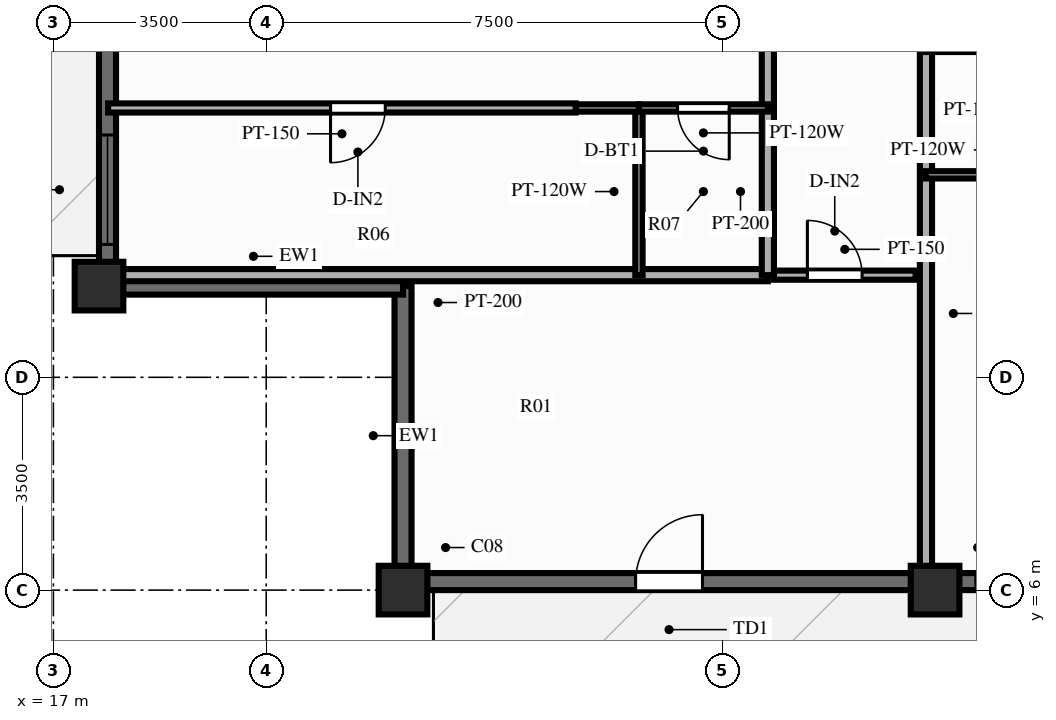
"""IFC4 building model, lengths in metres.
Left out: names, types, materials, properties, quantities, classifications, styles, units other than length and angle.
Written with IfcOpenShell. Run it as: python <this file> out.ifc"""

import sys

from ifc_helpers import new_model, si_unit, direction, frame, frame_2d, origin, origin_2d, place, context, subcontext, project, spatial, rectangle, extrude, source, transform, mapped, element, fill, save


model = new_model("IFC4")
c1 = context("Model", 3, precision=1e-05, world=origin(), true_north=direction((0.0, 1.0)))
c2 = subcontext(c1, "Body", "Model", "MODEL_VIEW")
j1 = project(units=[si_unit("LENGTHUNIT", "METRE"), si_unit("PLANEANGLEUNIT", "RADIAN")], contexts=[c1])
p1 = place(None, origin())
s1 = spatial("IfcSite", under=j1, at=p1, CompositionType="ELEMENT")
p2 = place(p1, origin())
s2 = spatial("IfcBuilding", under=s1, at=p2, CompositionType="ELEMENT")
p3 = place(p2, frame((0.0, 0.0, 182.8)))
s3 = spatial("IfcBuildingStorey", under=s2, at=p3, CompositionType="ELEMENT", Elevation=182.8)
m1 = source(origin(), c2, "Body", "SweptSolid", [
    extrude(rectangle(XDim=0.8, YDim=0.8, at=origin_2d()), origin(), (0.0, 0.0, 1.0), 3.9),
])
for number, where, z_axis, x_axis in (
    (1, (22.75, 6.0, 0.0), (0.0, 0.0, 1.0), (1.0, 0.0, 0.0)),
    (2, (31.5, 6.0, 0.0), (0.0, 0.0, 1.0), (1.0, 0.0, 0.0)),
    (3, (17.75, 11.0, 0.0), (0.0, 0.0, 1.0), (1.0, 0.0, 0.0)),
):
    element("IfcColumn", number, at=place(p3, frame(where, z_axis=z_axis, x_axis=x_axis)), inside=s3, PredefinedType="COLUMN", context=c2, shape_type="MappedRepresentation", body=[
        mapped(m1, transform((0.0, 0.0, 0.0), scale=1.0)),
    ])
p4 = place(p3, frame((22.75, 6.14, 0.0), z_axis=(0.0, 0.0, 1.0), x_axis=(1.0, 0.0, 0.0)))
e4 = element("IfcWall", 4, at=p4, inside=s3, PredefinedType="SOLIDWALL", context=c2, shape_type="SweptSolid", body=[
    extrude(rectangle(XDim=30.5, YDim=0.28, at=frame_2d((15.25, 0.0))), origin(), (0.0, 0.0, 1.0), 2.79),
])
p5 = place(p4, frame((4.925, 0.0, 0.0), z_axis=(0.0, 0.0, 1.0), x_axis=(-1.0, 0.0, 0.0)))
e5 = element("IfcOpeningElement", 5, at=p5, cuts=e4, PredefinedType="OPENING", context=c2, shape_type="SweptSolid", body=[
    extrude(rectangle(XDim=1.1, YDim=2.15, at=frame_2d((0.55, 1.075))), frame((0.0, 0.152, 0.0), z_axis=(0.0, -1.0, 0.0), x_axis=(1.0, 0.0, 0.0)), (0.0, 0.0, 1.0), 0.304),
])
p6 = place(p4, frame((9.42, 0.0, 0.85)))
e6 = element("IfcOpeningElement", 6, at=p6, cuts=e4, PredefinedType="OPENING", context=c2, shape_type="SweptSolid", body=[
    extrude(rectangle(XDim=0.95, YDim=1.5, at=frame_2d((0.475, 0.75))), frame((0.0, 0.152, 0.0), z_axis=(0.0, -1.0, 0.0), x_axis=(1.0, 0.0, 0.0)), (0.0, 0.0, 1.0), 0.304),
])
p7 = place(p4, frame((11.244, 0.0, 0.85)))
e7 = element("IfcOpeningElement", 7, at=p7, cuts=e4, PredefinedType="OPENING", context=c2, shape_type="SweptSolid", body=[
    extrude(rectangle(XDim=1.2, YDim=1.5, at=frame_2d((0.6, 0.75))), frame((0.0, 0.152, 0.0), z_axis=(0.0, -1.0, 0.0), x_axis=(1.0, 0.0, 0.0)), (0.0, 0.0, 1.0), 0.304),
])
p8 = place(p4, frame((13.452, 0.0, 0.85)))
e8 = element("IfcOpeningElement", 8, at=p8, cuts=e4, PredefinedType="OPENING", context=c2, shape_type="SweptSolid", body=[
    extrude(rectangle(XDim=1.5, YDim=1.65, at=frame_2d((0.75, 0.825))), frame((0.0, 0.152, 0.0), z_axis=(0.0, -1.0, 0.0), x_axis=(1.0, 0.0, 0.0)), (0.0, 0.0, 1.0), 0.304),
])
p9 = place(p4, frame((16.383, 0.0, 0.85)))
e9 = element("IfcOpeningElement", 9, at=p9, cuts=e4, PredefinedType="OPENING", context=c2, shape_type="SweptSolid", body=[
    extrude(rectangle(XDim=1.8, YDim=1.65, at=frame_2d((0.9, 0.825))), frame((0.0, 0.152, 0.0), z_axis=(0.0, -1.0, 0.0), x_axis=(1.0, 0.0, 0.0)), (0.0, 0.0, 1.0), 0.304),
])
p10 = place(p4, frame((19.53, 0.0, 0.85)))
e10 = element("IfcOpeningElement", 10, at=p10, cuts=e4, PredefinedType="OPENING", context=c2, shape_type="SweptSolid", body=[
    extrude(rectangle(XDim=1.5, YDim=1.65, at=frame_2d((0.75, 0.825))), frame((0.0, 0.152, 0.0), z_axis=(0.0, -1.0, 0.0), x_axis=(1.0, 0.0, 0.0)), (0.0, 0.0, 1.0), 0.304),
])
p11 = place(p4, frame((25.225, 0.0, 0.85)))
e11 = element("IfcOpeningElement", 11, at=p11, cuts=e4, PredefinedType="OPENING", context=c2, shape_type="SweptSolid", body=[
    extrude(rectangle(XDim=1.8, YDim=1.65, at=frame_2d((0.9, 0.825))), frame((0.0, 0.152, 0.0), z_axis=(0.0, -1.0, 0.0), x_axis=(1.0, 0.0, 0.0)), (0.0, 0.0, 1.0), 0.304),
])
p12 = place(p3, frame((17.89, 11.0, 0.0), z_axis=(0.0, 0.0, 1.0), x_axis=(0.0, 1.0, 0.0)))
e12 = element("IfcWall", 12, at=p12, inside=s3, PredefinedType="SOLIDWALL", context=c2, shape_type="SweptSolid", body=[
    extrude(rectangle(XDim=32.0, YDim=0.28, at=frame_2d((16.0, 0.0))), origin(), (0.0, 0.0, 1.0), 2.79),
])
p13 = place(p12, frame((0.685, 0.0, 0.85)))
e13 = element("IfcOpeningElement", 13, at=p13, cuts=e12, PredefinedType="OPENING", context=c2, shape_type="SweptSolid", body=[
    extrude(rectangle(XDim=1.8, YDim=1.65, at=frame_2d((0.9, 0.825))), frame((0.0, 0.152, 0.0), z_axis=(0.0, -1.0, 0.0), x_axis=(1.0, 0.0, 0.0)), (0.0, 0.0, 1.0), 0.304),
])
p14 = place(p12, frame((3.945, 0.0, 0.85)))
e14 = element("IfcOpeningElement", 14, at=p14, cuts=e12, PredefinedType="OPENING", context=c2, shape_type="SweptSolid", body=[
    extrude(rectangle(XDim=1.8, YDim=1.65, at=frame_2d((0.9, 0.825))), frame((0.0, 0.152, 0.0), z_axis=(0.0, -1.0, 0.0), x_axis=(1.0, 0.0, 0.0)), (0.0, 0.0, 1.0), 0.304),
])
p15 = place(p12, frame((8.367, 0.0, 0.85)))
e15 = element("IfcOpeningElement", 15, at=p15, cuts=e12, PredefinedType="OPENING", context=c2, shape_type="SweptSolid", body=[
    extrude(rectangle(XDim=1.8, YDim=1.65, at=frame_2d((0.9, 0.825))), frame((0.0, 0.152, 0.0), z_axis=(0.0, -1.0, 0.0), x_axis=(1.0, 0.0, 0.0)), (0.0, 0.0, 1.0), 0.304),
])
p16 = place(p12, frame((11.729, 0.0, 0.85)))
e16 = element("IfcOpeningElement", 16, at=p16, cuts=e12, PredefinedType="OPENING", context=c2, shape_type="SweptSolid", body=[
    extrude(rectangle(XDim=1.8, YDim=1.65, at=frame_2d((0.9, 0.825))), frame((0.0, 0.152, 0.0), z_axis=(0.0, -1.0, 0.0), x_axis=(1.0, 0.0, 0.0)), (0.0, 0.0, 1.0), 0.304),
])
p17 = place(p12, frame((15.066, 0.0, 0.0)))
e17 = element("IfcOpeningElement", 17, at=p17, cuts=e12, PredefinedType="OPENING", context=c2, shape_type="SweptSolid", body=[
    extrude(rectangle(XDim=1.6, YDim=2.15, at=frame_2d((0.8, 1.075))), frame((0.0, 0.152, 0.0), z_axis=(0.0, -1.0, 0.0), x_axis=(1.0, 0.0, 0.0)), (0.0, 0.0, 1.0), 0.304),
])
p18 = place(p12, frame((18.811, 0.0, 0.85)))
e18 = element("IfcOpeningElement", 18, at=p18, cuts=e12, PredefinedType="OPENING", context=c2, shape_type="SweptSolid", body=[
    extrude(rectangle(XDim=1.8, YDim=1.65, at=frame_2d((0.9, 0.825))), frame((0.0, 0.152, 0.0), z_axis=(0.0, -1.0, 0.0), x_axis=(1.0, 0.0, 0.0)), (0.0, 0.0, 1.0), 0.304),
])
p19 = place(p12, frame((22.17, 0.0, 0.85)))
e19 = element("IfcOpeningElement", 19, at=p19, cuts=e12, PredefinedType="OPENING", context=c2, shape_type="SweptSolid", body=[
    extrude(rectangle(XDim=1.8, YDim=1.65, at=frame_2d((0.9, 0.825))), frame((0.0, 0.152, 0.0), z_axis=(0.0, -1.0, 0.0), x_axis=(1.0, 0.0, 0.0)), (0.0, 0.0, 1.0), 0.304),
])
p20 = place(p12, frame((25.706, 0.0, 0.85)))
e20 = element("IfcOpeningElement", 20, at=p20, cuts=e12, PredefinedType="OPENING", context=c2, shape_type="SweptSolid", body=[
    extrude(rectangle(XDim=1.8, YDim=1.65, at=frame_2d((0.9, 0.825))), frame((0.0, 0.152, 0.0), z_axis=(0.0, -1.0, 0.0), x_axis=(1.0, 0.0, 0.0)), (0.0, 0.0, 1.0), 0.304),
])
p21 = place(p12, frame((28.966, 0.0, 0.85)))
e21 = element("IfcOpeningElement", 21, at=p21, cuts=e12, PredefinedType="OPENING", context=c2, shape_type="SweptSolid", body=[
    extrude(rectangle(XDim=1.8, YDim=1.65, at=frame_2d((0.9, 0.825))), frame((0.0, 0.152, 0.0), z_axis=(0.0, -1.0, 0.0), x_axis=(1.0, 0.0, 0.0)), (0.0, 0.0, 1.0), 0.304),
])
for number, where, z_axis, x_axis in (
    (22, (22.75, 6.08, 0.0), (0.0, 0.0, 1.0), (0.0, 1.0, 0.0)),
    (23, (17.83, 11.0, 0.0), (0.0, 0.0, 1.0), (1.0, 0.0, 0.0)),
):
    element("IfcWall", number, at=place(p3, frame(where, z_axis=z_axis, x_axis=x_axis)), inside=s3, PredefinedType="SOLIDWALL", context=c2, shape_type="SweptSolid", body=[
        extrude(rectangle(XDim=4.92, YDim=0.28, at=frame_2d((2.46, 0.0))), origin(), (0.0, 0.0, 1.0), 2.79),
    ])
p22 = place(p3, frame((28.85, 11.18, 0.0), z_axis=(0.0, 0.0, 1.0), x_axis=(1.0, 0.0, 0.0)))
e24 = element("IfcWall", 24, at=p22, inside=s3, PredefinedType="PARTITIONING", context=c2, shape_type="SweptSolid", body=[
    extrude(rectangle(XDim=2.33, YDim=0.15, at=frame_2d((1.165, 0.0))), origin(), (0.0, 0.0, 1.0), 3.69),
])
p23 = place(p22, frame((0.55, 0.0, 0.0)))
e25 = element("IfcOpeningElement", 25, at=p23, cuts=e24, PredefinedType="OPENING", context=c2, shape_type="SweptSolid", body=[
    extrude(rectangle(XDim=0.9, YDim=2.1, at=frame_2d((0.45, 1.05))), frame((0.0, 0.087, 0.0), z_axis=(0.0, -1.0, 0.0), x_axis=(1.0, 0.0, 0.0)), (0.0, 0.0, 1.0), 0.174),
])
p24 = place(p3, frame((31.35, 14.95, 0.0), z_axis=(0.0, 0.0, 1.0), x_axis=(0.0, -1.0, 0.0)))
e26 = element("IfcWall", 26, at=p24, inside=s3, PredefinedType="PARTITIONING", context=c2, shape_type="SweptSolid", body=[
    extrude(rectangle(XDim=8.8, YDim=0.2, at=frame_2d((4.4, 0.0))), origin(), (0.0, 0.0, 1.0), 2.79),
])
p25 = place(p3, frame((31.35, 14.95, 0.0), z_axis=(0.0, 0.0, 1.0), x_axis=(1.0, 0.0, 0.0)))
e27 = element("IfcWall", 27, at=p25, inside=s3, PredefinedType="PARTITIONING", context=c2, shape_type="SweptSolid", body=[
    extrude(rectangle(XDim=2.2, YDim=0.2, at=frame_2d((1.1, 0.0))), origin(), (0.0, 0.0, 1.0), 3.69),
])
p26 = place(p3, frame((31.35, 12.83, 0.0), z_axis=(0.0, 0.0, 1.0), x_axis=(1.0, 0.0, 0.0)))
e28 = element("IfcWall", 28, at=p26, inside=s3, PredefinedType="PARTITIONING", context=c2, shape_type="SweptSolid", body=[
    extrude(rectangle(XDim=2.2, YDim=0.12, at=frame_2d((1.1, 0.0))), origin(), (0.0, 0.0, 1.0), 3.69),
])
p27 = place(p3, frame((28.75, 11.18, 0.0), z_axis=(0.0, 0.0, 1.0), x_axis=(-1.0, 0.0, 0.0)))
e29 = element("IfcWall", 29, at=p27, inside=s3, PredefinedType="PARTITIONING", context=c2, shape_type="SweptSolid", body=[
    extrude(rectangle(XDim=10.85, YDim=0.2, at=frame_2d((5.425, 0.0))), origin(), (0.0, 0.0, 1.0), 3.69),
])
p28 = place(p3, frame((28.75, 11.18, 0.0), z_axis=(0.0, 0.0, 1.0), x_axis=(0.0, 1.0, 0.0)))
e30 = element("IfcWall", 30, at=p28, inside=s3, PredefinedType="PARTITIONING", context=c2, shape_type="SweptSolid", body=[
    extrude(rectangle(XDim=2.75, YDim=0.2, at=frame_2d((1.375, 0.0))), origin(), (0.0, 0.0, 1.0), 3.69),
])
p29 = place(p3, frame((28.75, 13.93, 0.0), z_axis=(0.0, 0.0, 1.0), x_axis=(0.0, 1.0, 0.0)))
e31 = element("IfcWall", 31, at=p29, inside=s3, PredefinedType="PARTITIONING", context=c2, shape_type="SweptSolid", body=[
    extrude(rectangle(XDim=4.35, YDim=0.2, at=frame_2d((2.175, 0.0))), origin(), (0.0, 0.0, 1.0), 3.69),
])
p30 = place(p29, frame((1.675, 0.0, 0.0)))
e32 = element("IfcOpeningElement", 32, at=p30, cuts=e31, PredefinedType="OPENING", context=c2, shape_type="SweptSolid", body=[
    extrude(rectangle(XDim=1.0, YDim=2.15, at=frame_2d((0.5, 1.075))), frame((0.0, 0.112, 0.0), z_axis=(0.0, -1.0, 0.0), x_axis=(1.0, 0.0, 0.0)), (0.0, 0.0, 1.0), 0.224),
])
p31 = place(p3, frame((26.63, 11.18, 0.0), z_axis=(0.0, 0.0, 1.0), x_axis=(0.0, 1.0, 0.0)))
e33 = element("IfcWall", 33, at=p31, inside=s3, PredefinedType="PARTITIONING", context=c2, shape_type="SweptSolid", body=[
    extrude(rectangle(XDim=2.75, YDim=0.12, at=frame_2d((1.375, 0.0))), origin(), (0.0, 0.0, 1.0), 3.69),
])
p32 = place(p3, frame((28.75, 13.93, 0.0), z_axis=(0.0, 0.0, 1.0), x_axis=(-1.0, 0.0, 0.0)))
e34 = element("IfcWall", 34, at=p32, inside=s3, PredefinedType="PARTITIONING", context=c2, shape_type="SweptSolid", body=[
    extrude(rectangle(XDim=2.12, YDim=0.12, at=frame_2d((1.06, 0.0))), origin(), (0.0, 0.0, 1.0), 3.69),
])
p33 = place(p32, frame((0.635, 0.0, 0.0)))
e35 = element("IfcOpeningElement", 35, at=p33, cuts=e34, PredefinedType="OPENING", context=c2, shape_type="SweptSolid", body=[
    extrude(rectangle(XDim=0.85, YDim=2.05, at=frame_2d((0.425, 1.025))), frame((0.0, 0.072, 0.0), z_axis=(0.0, -1.0, 0.0), x_axis=(1.0, 0.0, 0.0)), (0.0, 0.0, 1.0), 0.144),
])
p34 = place(p3, frame((26.63, 13.93, 0.0), z_axis=(0.0, 0.0, 1.0), x_axis=(-1.0, 0.0, 0.0)))
e36 = element("IfcWall", 36, at=p34, inside=s3, PredefinedType="PARTITIONING", context=c2, shape_type="SweptSolid", body=[
    extrude(rectangle(XDim=1.04, YDim=0.12, at=frame_2d((0.52, 0.0))), origin(), (0.0, 0.0, 1.0), 3.69),
])
p35 = place(p3, frame((25.59, 13.93, 0.0), z_axis=(0.0, 0.0, 1.0), x_axis=(-1.0, 0.0, 0.0)))
e37 = element("IfcWall", 37, at=p35, inside=s3, PredefinedType="PARTITIONING", context=c2, shape_type="SweptSolid", body=[
    extrude(rectangle(XDim=7.69, YDim=0.15, at=frame_2d((3.845, 0.0))), origin(), (0.0, 0.0, 1.0), 3.69),
])
p36 = place(p35, frame((3.132, 0.0, 0.0)))
e38 = element("IfcOpeningElement", 38, at=p36, cuts=e37, PredefinedType="OPENING", context=c2, shape_type="SweptSolid", body=[
    extrude(rectangle(XDim=0.9, YDim=2.1, at=frame_2d((0.45, 1.05))), frame((0.0, 0.087, 0.0), z_axis=(0.0, -1.0, 0.0), x_axis=(1.0, 0.0, 0.0)), (0.0, 0.0, 1.0), 0.174),
])
m2 = source(origin(), c2, "Body", "SweptSolid", [
    extrude(rectangle(XDim=1.1, YDim=2.15, at=frame_2d((0.55, 1.075))), frame((0.0, 0.025, 0.0), z_axis=(0.0, -1.0, 0.0), x_axis=(1.0, 0.0, 0.0)), (0.0, 0.0, 1.0), 0.05),
])
p37 = place(p5, origin())
e39 = element("IfcDoor", 39, at=p37, inside=s3, OperationType="SINGLE_SWING_LEFT", PredefinedType="DOOR", context=c2, shape_type="MappedRepresentation", body=[
    mapped(m2, transform((0.0, 0.0, 0.0), scale=1.0)),
])
fill(e5, e39)
m3 = source(origin(), c2, "Body", "SweptSolid", [
    extrude(rectangle(XDim=0.95, YDim=1.5, at=frame_2d((0.475, 0.75))), frame((0.0, 0.03, 0.0), z_axis=(0.0, -1.0, 0.0), x_axis=(1.0, 0.0, 0.0)), (0.0, 0.0, 1.0), 0.06),
])
p38 = place(p6, origin())
e40 = element("IfcWindow", 40, at=p38, inside=s3, PartitioningType="SINGLE_PANEL", PredefinedType="WINDOW", context=c2, shape_type="MappedRepresentation", body=[
    mapped(m3, transform((0.0, 0.0, 0.0), scale=1.0)),
])
fill(e6, e40)
m4 = source(origin(), c2, "Body", "SweptSolid", [
    extrude(rectangle(XDim=1.8, YDim=1.65, at=frame_2d((0.9, 0.825))), frame((0.0, 0.03, 0.0), z_axis=(0.0, -1.0, 0.0), x_axis=(1.0, 0.0, 0.0)), (0.0, 0.0, 1.0), 0.06),
])
p39 = place(p13, origin())
e41 = element("IfcWindow", 41, at=p39, inside=s3, PartitioningType="SINGLE_PANEL", PredefinedType="WINDOW", context=c2, shape_type="MappedRepresentation", body=[
    mapped(m4, transform((0.0, 0.0, 0.0), scale=1.0)),
])
fill(e13, e41)
m5 = source(origin(), c2, "Body", "SweptSolid", [
    extrude(rectangle(XDim=0.9, YDim=2.1, at=frame_2d((0.45, 1.05))), frame((0.0, 0.025, 0.0), z_axis=(0.0, -1.0, 0.0), x_axis=(1.0, 0.0, 0.0)), (0.0, 0.0, 1.0), 0.05),
])
p40 = place(p23, origin())
e42 = element("IfcDoor", 42, at=p40, inside=s3, OperationType="SINGLE_SWING_LEFT", PredefinedType="DOOR", context=c2, shape_type="MappedRepresentation", body=[
    mapped(m5, transform((0.0, 0.0, 0.0), scale=1.0)),
])
fill(e25, e42)
m6 = source(origin(), c2, "Body", "SweptSolid", [
    extrude(rectangle(XDim=0.85, YDim=2.05, at=frame_2d((0.425, 1.025))), frame((0.0, 0.025, 0.0), z_axis=(0.0, -1.0, 0.0), x_axis=(1.0, 0.0, 0.0)), (0.0, 0.0, 1.0), 0.05),
])
p41 = place(p33, origin())
e43 = element("IfcDoor", 43, at=p41, inside=s3, OperationType="SINGLE_SWING_LEFT", PredefinedType="DOOR", context=c2, shape_type="MappedRepresentation", body=[
    mapped(m6, transform((0.0, 0.0, 0.0), scale=1.0)),
])
fill(e35, e43)
p42 = place(p36, origin())
e44 = element("IfcDoor", 44, at=p42, inside=s3, OperationType="SINGLE_SWING_RIGHT", PredefinedType="DOOR", context=c2, shape_type="MappedRepresentation", body=[
    mapped(m5, transform((0.0, 0.0, 0.0), scale=1.0)),
])
fill(e38, e44)
save(model, sys.argv[1])
